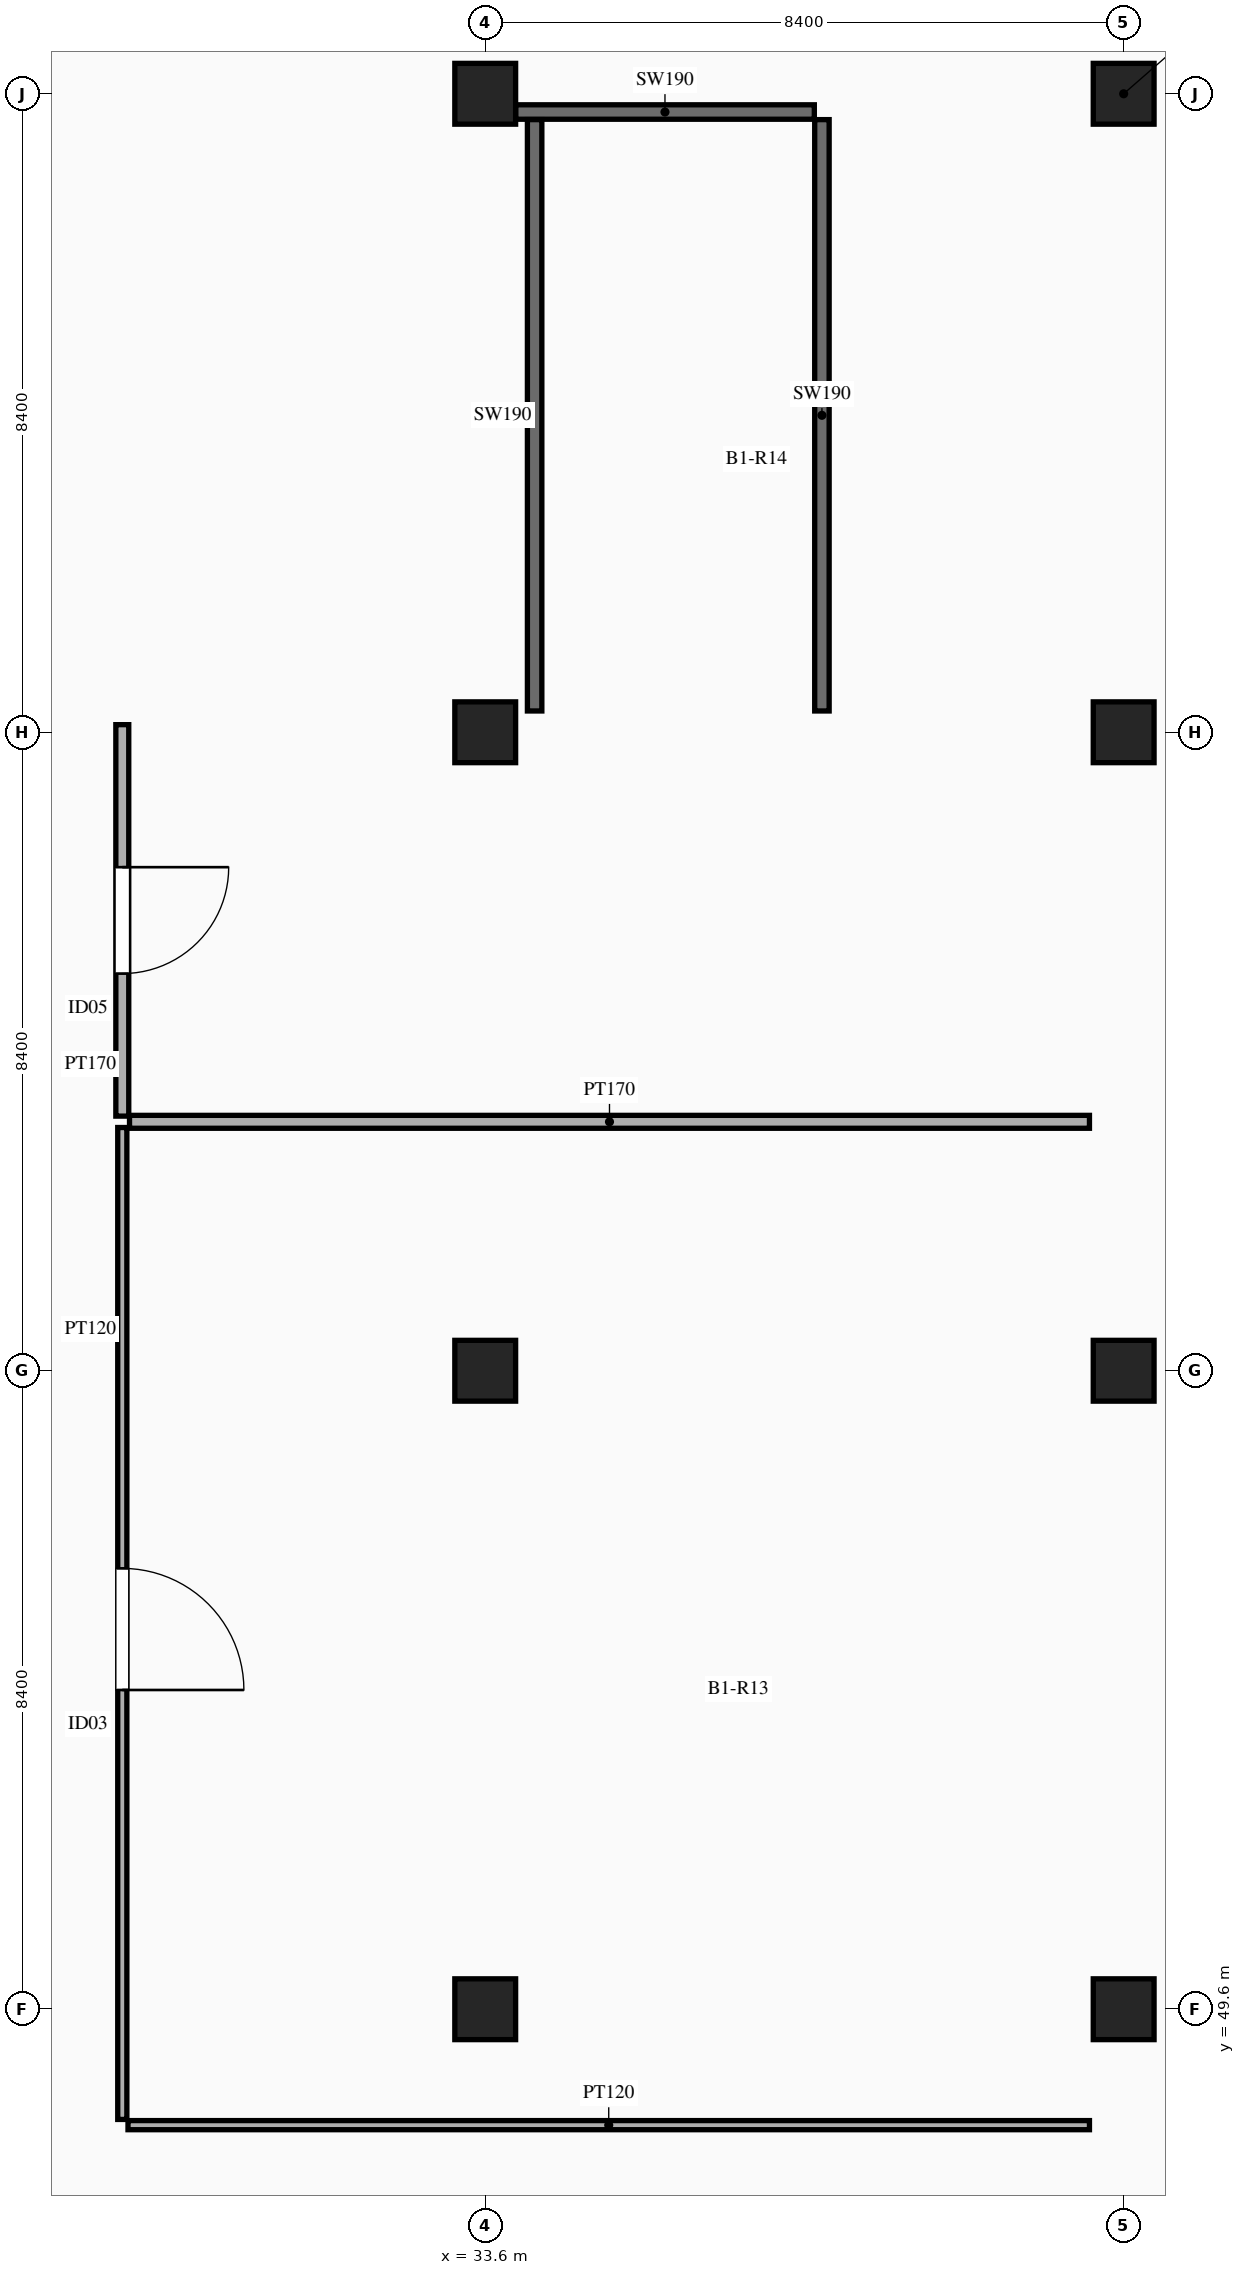
"""IFC4 building model, lengths in metres.
Left out: names, types, materials, properties, quantities, classifications, styles, units other than length and angle.
Written with IfcOpenShell. Run it as: python <this file> out.ifc"""

import sys

from ifc_helpers import new_model, si_unit, direction, frame, frame_2d, origin, origin_2d, place, context, subcontext, project, spatial, rectangle, extrude, element, fill, save


model = new_model("IFC4")
c1 = context("Model", 3, precision=1e-05, world=origin(), true_north=direction((0.0, 1.0)))
c2 = subcontext(c1, "Body", "Model", "MODEL_VIEW")
j1 = project(units=[si_unit("LENGTHUNIT", "METRE"), si_unit("PLANEANGLEUNIT", "RADIAN")], contexts=[c1])
p1 = place(None, origin())
s1 = spatial("IfcSite", under=j1, at=p1, CompositionType="ELEMENT")
p2 = place(p1, origin())
s2 = spatial("IfcBuilding", under=s1, at=p2, CompositionType="ELEMENT")
p3 = place(p2, frame((0.0, 0.0, -4.5)))
s3 = spatial("IfcBuildingStorey", under=s2, at=p3, CompositionType="ELEMENT", Elevation=-4.5)
for number, where, z_axis, x_axis in (
    (1, (33.6, 49.6, 0.0), (0.0, 0.0, 1.0), (1.0, 0.0, 0.0)),
    (2, (33.6, 58.0, 0.0), (0.0, 0.0, 1.0), (1.0, 0.0, 0.0)),
    (3, (33.6, 66.4, 0.0), (0.0, 0.0, 1.0), (1.0, 0.0, 0.0)),
    (4, (33.6, 74.8, 0.0), (0.0, 0.0, 1.0), (1.0, 0.0, 0.0)),
    (5, (42.0, 49.6, 0.0), (0.0, 0.0, 1.0), (1.0, 0.0, 0.0)),
    (6, (42.0, 58.0, 0.0), (0.0, 0.0, 1.0), (1.0, 0.0, 0.0)),
    (7, (42.0, 66.4, 0.0), (0.0, 0.0, 1.0), (1.0, 0.0, 0.0)),
    (8, (42.0, 74.8, 0.0), (0.0, 0.0, 1.0), (1.0, 0.0, 0.0)),
):
    element("IfcColumn", number, at=place(p3, frame(where, z_axis=z_axis, x_axis=x_axis)), inside=s3, PredefinedType="COLUMN", context=c2, shape_type="SweptSolid", body=[
        extrude(rectangle(XDim=0.8, YDim=0.8, at=origin_2d()), origin(), (0.0, 0.0, 1.0), 4.5),
    ])
p4 = place(p3, frame((34.0, 74.56, 0.0), z_axis=(0.0, 0.0, 1.0), x_axis=(1.0, 0.0, 0.0)))
e9 = element("IfcWall", 9, at=p4, inside=s3, PredefinedType="SOLIDWALL", context=c2, shape_type="SweptSolid", body=[
    extrude(rectangle(XDim=3.93, YDim=0.19, at=frame_2d((1.965, 0.0))), origin(), (0.0, 0.0, 1.0), 4.3),
])
for number, where, z_axis, x_axis in (
    (10, (34.25, 66.68, 0.0), (0.0, 0.0, 1.0), (0.0, 1.0, 0.0)),
    (11, (38.03, 66.68, 0.0), (0.0, 0.0, 1.0), (0.0, 1.0, 0.0)),
):
    element("IfcWall", number, at=place(p3, frame(where, z_axis=z_axis, x_axis=x_axis)), inside=s3, PredefinedType="SOLIDWALL", context=c2, shape_type="SweptSolid", body=[
        extrude(rectangle(XDim=7.78, YDim=0.19, at=frame_2d((3.89, 0.0))), origin(), (0.0, 0.0, 1.0), 4.3),
    ])
p5 = place(p3, frame((28.825, 48.15, 0.0), z_axis=(0.0, 0.0, 1.0), x_axis=(0.0, 1.0, 0.0)))
e12 = element("IfcWall", 12, at=p5, inside=s3, PredefinedType="PARTITIONING", context=c2, shape_type="SweptSolid", body=[
    extrude(rectangle(XDim=13.05, YDim=0.12, at=frame_2d((6.525, 0.0))), origin(), (0.0, 0.0, 1.0), 3.45),
])
p6 = place(p5, frame((5.65, 0.0, 0.0)))
e13 = element("IfcOpeningElement", 13, at=p6, cuts=e12, PredefinedType="OPENING", context=c2, shape_type="SweptSolid", body=[
    extrude(rectangle(XDim=1.6, YDim=2.35, at=frame_2d((0.8, 1.175))), frame((0.0, 0.07, 0.0), z_axis=(0.0, -1.0, 0.0), x_axis=(1.0, 0.0, 0.0)), (0.0, 0.0, 1.0), 0.14),
])
p7 = place(p3, frame((28.825, 61.35, 0.0), z_axis=(0.0, 0.0, 1.0), x_axis=(0.0, 1.0, 0.0)))
e14 = element("IfcWall", 14, at=p7, inside=s3, PredefinedType="PARTITIONING", context=c2, shape_type="SweptSolid", body=[
    extrude(rectangle(XDim=5.15, YDim=0.17, at=frame_2d((2.575, 0.0))), origin(), (0.0, 0.0, 1.0), 3.45),
])
p8 = place(p7, frame((1.875, 0.0, 0.0)))
e15 = element("IfcOpeningElement", 15, at=p8, cuts=e14, PredefinedType="OPENING", context=c2, shape_type="SweptSolid", body=[
    extrude(rectangle(XDim=1.4, YDim=2.25, at=frame_2d((0.7, 1.125))), frame((0.0, 0.095, 0.0), z_axis=(0.0, -1.0, 0.0), x_axis=(1.0, 0.0, 0.0)), (0.0, 0.0, 1.0), 0.19),
])
p9 = place(p3, frame((28.9, 48.075, 0.0), z_axis=(0.0, 0.0, 1.0), x_axis=(1.0, 0.0, 0.0)))
e16 = element("IfcWall", 16, at=p9, inside=s3, PredefinedType="PARTITIONING", context=c2, shape_type="SweptSolid", body=[
    extrude(rectangle(XDim=12.65, YDim=0.12, at=frame_2d((6.325, 0.0))), origin(), (0.0, 0.0, 1.0), 3.45),
])
p10 = place(p3, frame((28.92, 61.275, 0.0), z_axis=(0.0, 0.0, 1.0), x_axis=(1.0, 0.0, 0.0)))
e17 = element("IfcWall", 17, at=p10, inside=s3, PredefinedType="PARTITIONING", context=c2, shape_type="SweptSolid", body=[
    extrude(rectangle(XDim=12.63, YDim=0.17, at=frame_2d((6.315, 0.0))), origin(), (0.0, 0.0, 1.0), 3.45),
])
p11 = place(p6, frame((1.6, 0.0, 0.0), z_axis=(0.0, 0.0, 1.0), x_axis=(-1.0, 0.0, 0.0)))
e18 = element("IfcDoor", 18, at=p11, inside=s3, OperationType="SINGLE_SWING_RIGHT", PredefinedType="DOOR", context=c2, shape_type="SweptSolid", body=[
    extrude(rectangle(XDim=1.6, YDim=2.35, at=frame_2d((0.8, 1.175))), frame((0.0, 0.025, 0.0), z_axis=(0.0, -1.0, 0.0), x_axis=(1.0, 0.0, 0.0)), (0.0, 0.0, 1.0), 0.05),
])
fill(e13, e18)
p12 = place(p8, frame((1.4, 0.0, 0.0), z_axis=(0.0, 0.0, 1.0), x_axis=(-1.0, 0.0, 0.0)))
e19 = element("IfcDoor", 19, at=p12, inside=s3, OperationType="SINGLE_SWING_LEFT", PredefinedType="DOOR", context=c2, shape_type="SweptSolid", body=[
    extrude(rectangle(XDim=1.4, YDim=2.25, at=frame_2d((0.7, 1.125))), frame((0.0, 0.025, 0.0), z_axis=(0.0, -1.0, 0.0), x_axis=(1.0, 0.0, 0.0)), (0.0, 0.0, 1.0), 0.05),
])
fill(e15, e19)
save(model, sys.argv[1])
